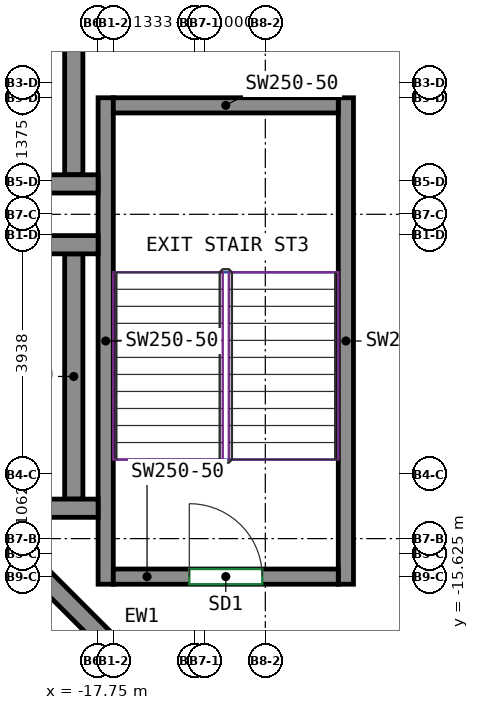
"""IFC4 building model, lengths in metres.
Left out: names, types, materials, properties, quantities, classifications, styles, units other than length and angle.
Written with IfcOpenShell. Run it as: python <this file> out.ifc"""

import sys

from ifc_helpers import new_model, si_unit, direction, frame, frame_2d, origin, place, context, subcontext, project, spatial, rectangle, extrude, source, transform, mapped, element, fill, save


model = new_model("IFC4")
c1 = context("Model", 3, precision=1e-05, world=origin(), true_north=direction((0.0, 1.0)))
c2 = subcontext(c1, "Body", "Model", "MODEL_VIEW")
j1 = project(units=[si_unit("LENGTHUNIT", "METRE"), si_unit("PLANEANGLEUNIT", "RADIAN")], contexts=[c1])
p1 = place(None, origin())
s1 = spatial("IfcSite", under=j1, at=p1, CompositionType="ELEMENT")
p2 = place(p1, origin())
s2 = spatial("IfcBuilding", under=s1, at=p2, CompositionType="ELEMENT")
p3 = place(p2, frame((0.0, 0.0, 262.8)))
s3 = spatial("IfcBuildingStorey", under=s2, at=p3, CompositionType="ELEMENT", Elevation=262.8)
m1 = source(origin(), c2, "Body", "SweptSolid", [
    extrude(rectangle(XDim=8.0, YDim=0.25, at=frame_2d((4.0, 0.0))), origin(), (0.0, 0.0, 1.0), 3.8),
])
for number, where, z_axis, x_axis in (
    (1, (-17.625, -15.75, 0.0), (0.0, 0.0, 1.0), (0.0, 1.0, 0.0)),
    (2, (-13.675, -15.75, 0.0), (0.0, 0.0, 1.0), (0.0, 1.0, 0.0)),
):
    element("IfcWall", number, at=place(p3, frame(where, z_axis=z_axis, x_axis=x_axis)), inside=s3, PredefinedType="SHEAR", context=c2, shape_type="MappedRepresentation", body=[
        mapped(m1, transform((0.0, 0.0, 0.0))),
    ])
m2 = source(origin(), c2, "Body", "SweptSolid", [
    extrude(rectangle(XDim=3.7, YDim=0.25, at=frame_2d((1.85, 0.0))), origin(), (0.0, 0.0, 1.0), 3.8),
])
p4 = place(p3, frame((-17.5, -15.625, 0.0), z_axis=(0.0, 0.0, 1.0), x_axis=(1.0, 0.0, 0.0)))
e3 = element("IfcWall", 3, at=p4, inside=s3, PredefinedType="SHEAR", context=c2, shape_type="MappedRepresentation", body=[
    mapped(m2, transform((0.0, 0.0, 0.0))),
])
p5 = place(p4, frame((1.25, 0.0, 0.0)))
e4 = element("IfcOpeningElement", 4, at=p5, cuts=e3, PredefinedType="OPENING", context=c2, shape_type="SweptSolid", body=[
    extrude(rectangle(XDim=1.2, YDim=2.1, at=frame_2d((0.6, 1.05))), frame((0.0, 0.135, 0.0), z_axis=(0.0, -1.0, 0.0), x_axis=(1.0, 0.0, 0.0)), (0.0, 0.0, 1.0), 0.27),
])
p6 = place(p3, frame((-17.5, -7.875, 0.0), z_axis=(0.0, 0.0, 1.0), x_axis=(1.0, 0.0, 0.0)))
e5 = element("IfcWall", 5, at=p6, inside=s3, PredefinedType="SHEAR", context=c2, shape_type="MappedRepresentation", body=[
    mapped(m2, transform((0.0, 0.0, 0.0))),
])
m3 = source(origin(), c2, "Body", "SweptSolid", [
    extrude(rectangle(XDim=7.533, YDim=0.3, at=frame_2d((3.767, 0.0))), origin(), (0.0, 0.0, 1.0), 1.1),
])
p7 = place(p3, frame((-18.15, -1.483, 0.0), z_axis=(0.0, 0.0, 1.0), x_axis=(0.0, -1.0, 0.0)))
e6 = element("IfcWall", 6, at=p7, inside=s3, PredefinedType="SOLIDWALL", context=c2, shape_type="MappedRepresentation", body=[
    mapped(m3, transform((0.0, 0.0, 0.0))),
])
m4 = source(origin(), c2, "Body", "SweptSolid", [
    extrude(rectangle(XDim=1.75, YDim=0.3, at=frame_2d((0.875, 0.0))), origin(), (0.0, 0.0, 1.0), 3.8),
])
p8 = place(p3, frame((-19.5, -9.167, 0.0), z_axis=(0.0, 0.0, 1.0), x_axis=(1.0, 0.0, 0.0)))
e7 = element("IfcWall", 7, at=p8, inside=s3, PredefinedType="SOLIDWALL", context=c2, shape_type="MappedRepresentation", body=[
    mapped(m4, transform((0.0, 0.0, 0.0))),
])
m5 = source(origin(), c2, "Body", "SweptSolid", [
    extrude(rectangle(XDim=4.033, YDim=0.3, at=frame_2d((2.017, 0.0))), origin(), (0.0, 0.0, 1.0), 1.1),
])
p9 = place(p3, frame((-18.15, -10.317, 0.0), z_axis=(0.0, 0.0, 1.0), x_axis=(0.0, -1.0, 0.0)))
e8 = element("IfcWall", 8, at=p9, inside=s3, PredefinedType="SOLIDWALL", context=c2, shape_type="MappedRepresentation", body=[
    mapped(m5, transform((0.0, 0.0, 0.0))),
])
for number, where, z_axis, x_axis in (
    (9, (-19.5, -10.167, 0.0), (0.0, 0.0, 1.0), (1.0, 0.0, 0.0)),
    (10, (-19.5, -14.5, 0.0), (0.0, 0.0, 1.0), (1.0, 0.0, 0.0)),
):
    element("IfcWall", number, at=place(p3, frame(where, z_axis=z_axis, x_axis=x_axis)), inside=s3, PredefinedType="SOLIDWALL", context=c2, shape_type="MappedRepresentation", body=[
        mapped(m4, transform((0.0, 0.0, 0.0))),
    ])
m6 = source(origin(), c2, "Body", "SweptSolid", [
    extrude(rectangle(XDim=3.323, YDim=0.3, at=frame_2d((1.662, 0.0))), origin(), (0.0, 0.0, 1.0), 2.3),
])
p10 = place(p3, frame((-18.819, -15.469, 0.0), z_axis=(0.0, 0.0, 1.0), x_axis=(0.707070049321, -0.707143511144, 0.0)))
e11 = element("IfcWall", 11, at=p10, inside=s3, PredefinedType="SOLIDWALL", context=c2, shape_type="MappedRepresentation", body=[
    mapped(m6, transform((0.0, 0.0, 0.0))),
])
p11 = place(p5, origin())
e12 = element("IfcDoor", 12, at=p11, inside=s3, OperationType="DOUBLE_DOOR_SINGLE_SWING", PredefinedType="DOOR", context=c2, shape_type="SweptSolid", body=[
    extrude(rectangle(XDim=1.2, YDim=2.1, at=frame_2d((0.6, 1.05))), frame((0.0, 0.025, 0.0), z_axis=(0.0, -1.0, 0.0), x_axis=(1.0, 0.0, 0.0)), (0.0, 0.0, 1.0), 0.05),
])
fill(e4, e12)
save(model, sys.argv[1])
